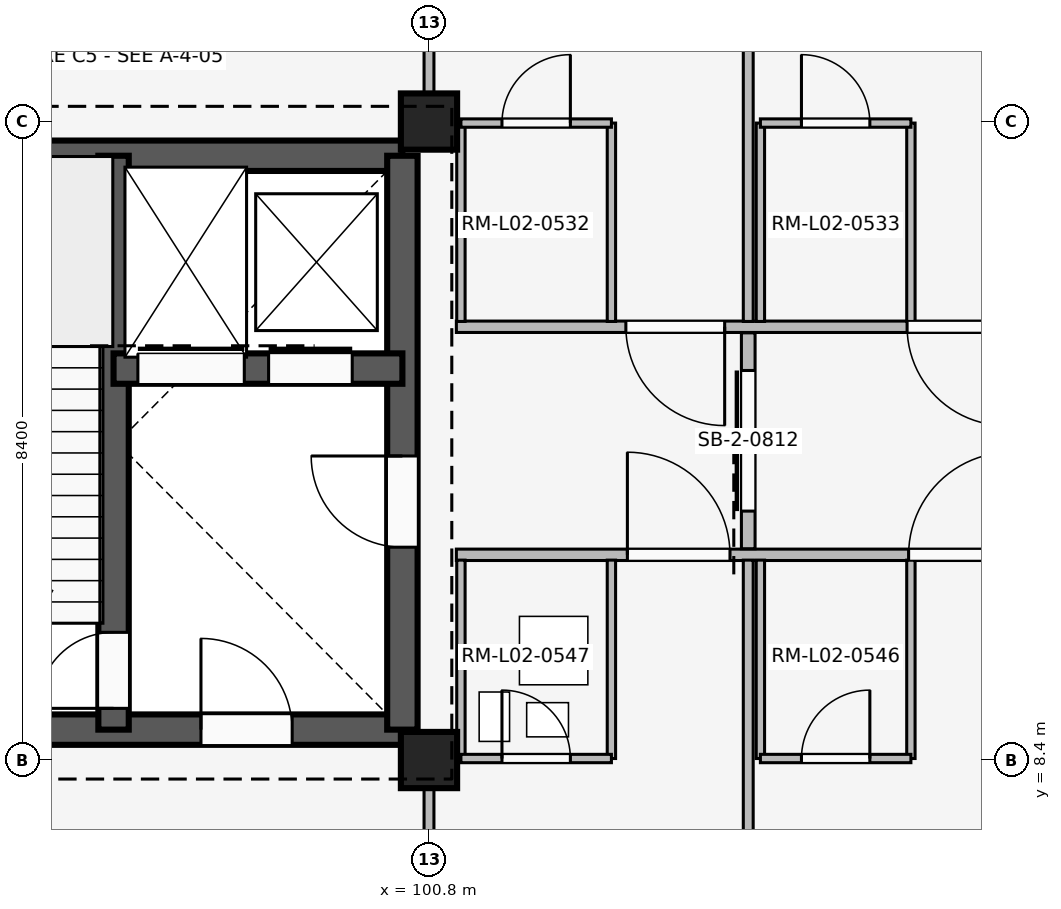
"""IFC4 building model, lengths in metres.
Left out: names, types, materials, properties, quantities, classifications, styles, units other than length and angle.
Written with IfcOpenShell. Run it as: python <this file> out.ifc"""

import sys

from ifc_helpers import new_model, si_unit, direction, frame, frame_2d, origin, origin_2d, place, context, subcontext, project, spatial, rectangle, extrude, element, fill, save


model = new_model("IFC4")
c1 = context("Model", 3, precision=1e-05, world=origin(), true_north=direction((0.0, 1.0)))
c2 = subcontext(c1, "Body", "Model", "MODEL_VIEW")
j1 = project(units=[si_unit("LENGTHUNIT", "METRE"), si_unit("PLANEANGLEUNIT", "RADIAN")], contexts=[c1])
p1 = place(None, origin())
s1 = spatial("IfcSite", under=j1, at=p1, CompositionType="ELEMENT")
p2 = place(p1, origin())
s2 = spatial("IfcBuilding", under=s1, at=p2, CompositionType="ELEMENT")
p3 = place(p2, frame((0.0, 0.0, 8.1)))
s3 = spatial("IfcBuildingStorey", under=s2, at=p3, CompositionType="ELEMENT", Elevation=8.1)
for number, where, z_axis, x_axis in (
    (1, (100.8, 8.4, 0.0), (0.0, 0.0, 1.0), (1.0, 0.0, 0.0)),
    (2, (100.8, 16.8, 0.0), (0.0, 0.0, 1.0), (1.0, 0.0, 0.0)),
):
    element("IfcColumn", number, at=place(p3, frame(where, z_axis=z_axis, x_axis=x_axis)), inside=s3, PredefinedType="COLUMN", context=c2, shape_type="SweptSolid", body=[
        extrude(rectangle(XDim=0.74, YDim=0.74, at=origin_2d()), origin(), (0.0, 0.0, 1.0), 4.8),
    ])
p4 = place(p3, frame((92.95, 8.8, 0.0), z_axis=(0.0, 0.0, 1.0), x_axis=(1.0, 0.0, 0.0)))
e3 = element("IfcWall", 3, at=p4, inside=s3, PredefinedType="SHEAR", context=c2, shape_type="SweptSolid", body=[
    extrude(rectangle(XDim=7.5, YDim=0.4, at=frame_2d((3.75, 0.0))), origin(), (0.0, 0.0, 1.0), 4.52),
])
p5 = place(p4, frame((4.85, 0.0, 0.0)))
e4 = element("IfcOpeningElement", 4, at=p5, cuts=e3, PredefinedType="OPENING", context=c2, shape_type="SweptSolid", body=[
    extrude(rectangle(XDim=1.2, YDim=2.2, at=frame_2d((0.6, 1.1))), frame((0.0, 0.21, 0.0), z_axis=(0.0, -1.0, 0.0), x_axis=(1.0, 0.0, 0.0)), (0.0, 0.0, 1.0), 0.42),
])
p6 = place(p3, frame((92.95, 16.35, 0.0), z_axis=(0.0, 0.0, 1.0), x_axis=(1.0, 0.0, 0.0)))
e5 = element("IfcWall", 5, at=p6, inside=s3, PredefinedType="SHEAR", context=c2, shape_type="SweptSolid", body=[
    extrude(rectangle(XDim=7.5, YDim=0.4, at=frame_2d((3.75, 0.0))), origin(), (0.0, 0.0, 1.0), 4.52),
])
p7 = place(p3, frame((100.45, 8.8, 0.0), z_axis=(0.0, 0.0, 1.0), x_axis=(0.0, 1.0, 0.0)))
e6 = element("IfcWall", 6, at=p7, inside=s3, PredefinedType="SHEAR", context=c2, shape_type="SweptSolid", body=[
    extrude(rectangle(XDim=7.55, YDim=0.4, at=frame_2d((3.775, 0.0))), origin(), (0.0, 0.0, 1.0), 4.52),
])
p8 = place(p7, frame((2.4, 0.0, 0.0)))
e7 = element("IfcOpeningElement", 7, at=p8, cuts=e6, PredefinedType="OPENING", context=c2, shape_type="SweptSolid", body=[
    extrude(rectangle(XDim=1.2, YDim=2.2, at=frame_2d((0.6, 1.1))), frame((0.0, 0.21, 0.0), z_axis=(0.0, -1.0, 0.0), x_axis=(1.0, 0.0, 0.0)), (0.0, 0.0, 1.0), 0.42),
])
p9 = place(p3, frame((96.65, 8.8, 0.0), z_axis=(0.0, 0.0, 1.0), x_axis=(0.0, 1.0, 0.0)))
e8 = element("IfcWall", 8, at=p9, inside=s3, PredefinedType="SHEAR", context=c2, shape_type="SweptSolid", body=[
    extrude(rectangle(XDim=7.55, YDim=0.4, at=frame_2d((3.775, 0.0))), origin(), (0.0, 0.0, 1.0), 4.52),
])
p10 = place(p9, frame((0.28, 0.0, 0.0)))
e9 = element("IfcOpeningElement", 9, at=p10, cuts=e8, PredefinedType="OPENING", context=c2, shape_type="SweptSolid", body=[
    extrude(rectangle(XDim=1.0, YDim=2.15, at=frame_2d((0.5, 1.075))), frame((0.0, 0.21, 0.0), z_axis=(0.0, -1.0, 0.0), x_axis=(1.0, 0.0, 0.0)), (0.0, 0.0, 1.0), 0.42),
])
p11 = place(p3, frame((96.65, 13.55, 0.0), z_axis=(0.0, 0.0, 1.0), x_axis=(1.0, 0.0, 0.0)))
e10 = element("IfcWall", 10, at=p11, inside=s3, PredefinedType="SHEAR", context=c2, shape_type="SweptSolid", body=[
    extrude(rectangle(XDim=3.8, YDim=0.4, at=frame_2d((1.9, 0.0))), origin(), (0.0, 0.0, 1.0), 4.52),
])
p12 = place(p11, frame((0.32, 0.0, 0.0)))
e11 = element("IfcOpeningElement", 11, at=p12, cuts=e10, PredefinedType="OPENING", context=c2, shape_type="SweptSolid", body=[
    extrude(rectangle(XDim=1.4, YDim=2.25, at=frame_2d((0.7, 1.125))), frame((0.0, 0.21, 0.0), z_axis=(0.0, -1.0, 0.0), x_axis=(1.0, 0.0, 0.0)), (0.0, 0.0, 1.0), 0.42),
])
p13 = place(p11, frame((2.04, 0.0, 0.0)))
e12 = element("IfcOpeningElement", 12, at=p13, cuts=e10, PredefinedType="OPENING", context=c2, shape_type="SweptSolid", body=[
    extrude(rectangle(XDim=1.1, YDim=2.15, at=frame_2d((0.55, 1.075))), frame((0.0, 0.21, 0.0), z_axis=(0.0, -1.0, 0.0), x_axis=(1.0, 0.0, 0.0)), (0.0, 0.0, 1.0), 0.42),
])
p14 = place(p3, frame((100.8, 0.14, 0.0), z_axis=(0.0, 0.0, 1.0), x_axis=(0.0, 1.0, 0.0)))
e13 = element("IfcWall", 13, at=p14, inside=s3, PredefinedType="PARTITIONING", context=c2, shape_type="SweptSolid", body=[
    extrude(rectangle(XDim=8.21, YDim=0.13, at=frame_2d((4.105, 0.0))), origin(), (0.0, 0.0, 1.0), 3.84),
])
p15 = place(p14, frame((3.64, 0.0, 0.0)))
e14 = element("IfcOpeningElement", 14, at=p15, cuts=e13, PredefinedType="OPENING", context=c2, shape_type="SweptSolid", body=[
    extrude(rectangle(XDim=1.08, YDim=2.15, at=frame_2d((0.54, 1.075))), frame((0.0, 0.075, 0.0), z_axis=(0.0, -1.0, 0.0), x_axis=(1.0, 0.0, 0.0)), (0.0, 0.0, 1.0), 0.15),
])
p16 = place(p3, frame((100.8, 17.15, 0.0), z_axis=(0.0, 0.0, 1.0), x_axis=(0.0, 1.0, 0.0)))
e15 = element("IfcWall", 15, at=p16, inside=s3, PredefinedType="PARTITIONING", context=c2, shape_type="SweptSolid", body=[
    extrude(rectangle(XDim=7.91, YDim=0.13, at=frame_2d((3.955, 0.0))), origin(), (0.0, 0.0, 1.0), 3.84),
])
p17 = place(p16, frame((3.4, 0.0, 0.0)))
e16 = element("IfcOpeningElement", 16, at=p17, cuts=e15, PredefinedType="OPENING", context=c2, shape_type="SweptSolid", body=[
    extrude(rectangle(XDim=1.05, YDim=2.2, at=frame_2d((0.525, 1.1))), frame((0.0, 0.075, 0.0), z_axis=(0.0, -1.0, 0.0), x_axis=(1.0, 0.0, 0.0)), (0.0, 0.0, 1.0), 0.15),
])
p18 = place(p3, frame((101.16, 11.1, 0.0), z_axis=(0.0, 0.0, 1.0), x_axis=(1.0, 0.0, 0.0)))
e17 = element("IfcWall", 17, at=p18, inside=s3, PredefinedType="PARTITIONING", context=c2, shape_type="SweptSolid", body=[
    extrude(rectangle(XDim=7.96, YDim=0.15, at=frame_2d((3.98, 0.0))), origin(), (0.0, 0.0, 1.0), 3.84),
])
p19 = place(p18, frame((2.25, 0.0, 0.0)))
e18 = element("IfcOpeningElement", 18, at=p19, cuts=e17, PredefinedType="OPENING", context=c2, shape_type="SweptSolid", body=[
    extrude(rectangle(XDim=1.35, YDim=2.25, at=frame_2d((0.675, 1.125))), frame((0.0, 0.085, 0.0), z_axis=(0.0, -1.0, 0.0), x_axis=(1.0, 0.0, 0.0)), (0.0, 0.0, 1.0), 0.17),
])
p20 = place(p18, frame((5.95, 0.0, 0.0)))
e19 = element("IfcOpeningElement", 19, at=p20, cuts=e17, PredefinedType="OPENING", context=c2, shape_type="SweptSolid", body=[
    extrude(rectangle(XDim=1.35, YDim=2.25, at=frame_2d((0.675, 1.125))), frame((0.0, 0.085, 0.0), z_axis=(0.0, -1.0, 0.0), x_axis=(1.0, 0.0, 0.0)), (0.0, 0.0, 1.0), 0.17),
])
p21 = place(p3, frame((105.0, 0.1, 0.0), z_axis=(0.0, 0.0, 1.0), x_axis=(0.0, 1.0, 0.0)))
e20 = element("IfcWall", 20, at=p21, inside=s3, PredefinedType="PARTITIONING", context=c2, shape_type="SweptSolid", body=[
    extrude(rectangle(XDim=10.93, YDim=0.13, at=frame_2d((5.465, 0.0))), origin(), (0.0, 0.0, 1.0), 3.84),
])
for number, where, z_axis, x_axis in (
    (21, (101.22, 8.42, 0.0), (0.0, 0.0, 1.0), (0.0, 1.0, 0.0)),
    (22, (103.2, 8.42, 0.0), (0.0, 0.0, 1.0), (0.0, 1.0, 0.0)),
):
    element("IfcWall", number, at=place(p3, frame(where, z_axis=z_axis, x_axis=x_axis)), inside=s3, PredefinedType="PARTITIONING", context=c2, shape_type="SweptSolid", body=[
        extrude(rectangle(XDim=2.61, YDim=0.11, at=frame_2d((1.305, 0.0))), origin(), (0.0, 0.0, 1.0), 3.84),
    ])
p22 = place(p3, frame((101.22, 8.42, 0.0), z_axis=(0.0, 0.0, 1.0), x_axis=(1.0, 0.0, 0.0)))
e23 = element("IfcWall", 23, at=p22, inside=s3, PredefinedType="PARTITIONING", context=c2, shape_type="SweptSolid", body=[
    extrude(rectangle(XDim=1.98, YDim=0.11, at=frame_2d((0.99, 0.0))), origin(), (0.0, 0.0, 1.0), 3.84),
])
p23 = place(p22, frame((0.54, 0.0, 0.0)))
e24 = element("IfcOpeningElement", 24, at=p23, cuts=e23, PredefinedType="OPENING", context=c2, shape_type="SweptSolid", body=[
    extrude(rectangle(XDim=0.9, YDim=2.1, at=frame_2d((0.45, 1.05))), frame((0.0, 0.065, 0.0), z_axis=(0.0, -1.0, 0.0), x_axis=(1.0, 0.0, 0.0)), (0.0, 0.0, 1.0), 0.13),
])
for number, where, z_axis, x_axis in (
    (25, (105.16, 8.42, 0.0), (0.0, 0.0, 1.0), (0.0, 1.0, 0.0)),
    (26, (107.14, 8.42, 0.0), (0.0, 0.0, 1.0), (0.0, 1.0, 0.0)),
):
    element("IfcWall", number, at=place(p3, frame(where, z_axis=z_axis, x_axis=x_axis)), inside=s3, PredefinedType="PARTITIONING", context=c2, shape_type="SweptSolid", body=[
        extrude(rectangle(XDim=2.61, YDim=0.11, at=frame_2d((1.305, 0.0))), origin(), (0.0, 0.0, 1.0), 3.84),
    ])
p24 = place(p3, frame((105.16, 8.42, 0.0), z_axis=(0.0, 0.0, 1.0), x_axis=(1.0, 0.0, 0.0)))
e27 = element("IfcWall", 27, at=p24, inside=s3, PredefinedType="PARTITIONING", context=c2, shape_type="SweptSolid", body=[
    extrude(rectangle(XDim=1.98, YDim=0.11, at=frame_2d((0.99, 0.0))), origin(), (0.0, 0.0, 1.0), 3.84),
])
p25 = place(p24, frame((0.54, 0.0, 0.0)))
e28 = element("IfcOpeningElement", 28, at=p25, cuts=e27, PredefinedType="OPENING", context=c2, shape_type="SweptSolid", body=[
    extrude(rectangle(XDim=0.9, YDim=2.1, at=frame_2d((0.45, 1.05))), frame((0.0, 0.065, 0.0), z_axis=(0.0, -1.0, 0.0), x_axis=(1.0, 0.0, 0.0)), (0.0, 0.0, 1.0), 0.13),
])
p26 = place(p3, frame((109.12, 14.1, 0.0), z_axis=(0.0, 0.0, 1.0), x_axis=(-1.0, 0.0, 0.0)))
e29 = element("IfcWall", 29, at=p26, inside=s3, PredefinedType="PARTITIONING", context=c2, shape_type="SweptSolid", body=[
    extrude(rectangle(XDim=7.96, YDim=0.15, at=frame_2d((3.98, 0.0))), origin(), (0.0, 0.0, 1.0), 3.84),
])
p27 = place(p26, frame((0.73, 0.0, 0.0)))
e30 = element("IfcOpeningElement", 30, at=p27, cuts=e29, PredefinedType="OPENING", context=c2, shape_type="SweptSolid", body=[
    extrude(rectangle(XDim=1.3, YDim=2.25, at=frame_2d((0.65, 1.125))), frame((0.0, 0.085, 0.0), z_axis=(0.0, -1.0, 0.0), x_axis=(1.0, 0.0, 0.0)), (0.0, 0.0, 1.0), 0.17),
])
p28 = place(p26, frame((4.43, 0.0, 0.0)))
e31 = element("IfcOpeningElement", 31, at=p28, cuts=e29, PredefinedType="OPENING", context=c2, shape_type="SweptSolid", body=[
    extrude(rectangle(XDim=1.3, YDim=2.25, at=frame_2d((0.65, 1.125))), frame((0.0, 0.085, 0.0), z_axis=(0.0, -1.0, 0.0), x_axis=(1.0, 0.0, 0.0)), (0.0, 0.0, 1.0), 0.17),
])
p29 = place(p3, frame((105.0, 14.17, 0.0), z_axis=(0.0, 0.0, 1.0), x_axis=(0.0, 1.0, 0.0)))
e32 = element("IfcWall", 32, at=p29, inside=s3, PredefinedType="PARTITIONING", context=c2, shape_type="SweptSolid", body=[
    extrude(rectangle(XDim=10.93, YDim=0.13, at=frame_2d((5.465, 0.0))), origin(), (0.0, 0.0, 1.0), 3.84),
])
for number, where, z_axis, x_axis in (
    (33, (101.22, 14.17, 0.0), (0.0, 0.0, 1.0), (0.0, 1.0, 0.0)),
    (34, (103.2, 14.17, 0.0), (0.0, 0.0, 1.0), (0.0, 1.0, 0.0)),
):
    element("IfcWall", number, at=place(p3, frame(where, z_axis=z_axis, x_axis=x_axis)), inside=s3, PredefinedType="PARTITIONING", context=c2, shape_type="SweptSolid", body=[
        extrude(rectangle(XDim=2.61, YDim=0.11, at=frame_2d((1.305, 0.0))), origin(), (0.0, 0.0, 1.0), 3.84),
    ])
p30 = place(p3, frame((101.22, 16.78, 0.0), z_axis=(0.0, 0.0, 1.0), x_axis=(1.0, 0.0, 0.0)))
e35 = element("IfcWall", 35, at=p30, inside=s3, PredefinedType="PARTITIONING", context=c2, shape_type="SweptSolid", body=[
    extrude(rectangle(XDim=1.98, YDim=0.11, at=frame_2d((0.99, 0.0))), origin(), (0.0, 0.0, 1.0), 3.84),
])
p31 = place(p30, frame((0.54, 0.0, 0.0)))
e36 = element("IfcOpeningElement", 36, at=p31, cuts=e35, PredefinedType="OPENING", context=c2, shape_type="SweptSolid", body=[
    extrude(rectangle(XDim=0.9, YDim=2.1, at=frame_2d((0.45, 1.05))), frame((0.0, 0.065, 0.0), z_axis=(0.0, -1.0, 0.0), x_axis=(1.0, 0.0, 0.0)), (0.0, 0.0, 1.0), 0.13),
])
for number, where, z_axis, x_axis in (
    (37, (105.16, 14.17, 0.0), (0.0, 0.0, 1.0), (0.0, 1.0, 0.0)),
    (38, (107.14, 14.17, 0.0), (0.0, 0.0, 1.0), (0.0, 1.0, 0.0)),
):
    element("IfcWall", number, at=place(p3, frame(where, z_axis=z_axis, x_axis=x_axis)), inside=s3, PredefinedType="PARTITIONING", context=c2, shape_type="SweptSolid", body=[
        extrude(rectangle(XDim=2.61, YDim=0.11, at=frame_2d((1.305, 0.0))), origin(), (0.0, 0.0, 1.0), 3.84),
    ])
p32 = place(p3, frame((105.16, 16.78, 0.0), z_axis=(0.0, 0.0, 1.0), x_axis=(1.0, 0.0, 0.0)))
e39 = element("IfcWall", 39, at=p32, inside=s3, PredefinedType="PARTITIONING", context=c2, shape_type="SweptSolid", body=[
    extrude(rectangle(XDim=1.98, YDim=0.11, at=frame_2d((0.99, 0.0))), origin(), (0.0, 0.0, 1.0), 3.84),
])
p33 = place(p32, frame((0.54, 0.0, 0.0)))
e40 = element("IfcOpeningElement", 40, at=p33, cuts=e39, PredefinedType="OPENING", context=c2, shape_type="SweptSolid", body=[
    extrude(rectangle(XDim=0.9, YDim=2.1, at=frame_2d((0.45, 1.05))), frame((0.0, 0.065, 0.0), z_axis=(0.0, -1.0, 0.0), x_axis=(1.0, 0.0, 0.0)), (0.0, 0.0, 1.0), 0.13),
])
p34 = place(p3, frame((105.0, 11.18, 0.0), z_axis=(0.0, 0.0, 1.0), x_axis=(0.0, 1.0, 0.0)))
e41 = element("IfcWall", 41, at=p34, inside=s3, PredefinedType="PARTITIONING", context=c2, shape_type="SweptSolid", body=[
    extrude(rectangle(XDim=2.84, YDim=0.18, at=frame_2d((1.42, 0.0))), origin(), (0.0, 0.0, 1.0), 3.84),
])
p35 = place(p34, frame((0.495, 0.0, 0.0)))
e42 = element("IfcOpeningElement", 42, at=p35, cuts=e41, PredefinedType="OPENING", context=c2, shape_type="SweptSolid", body=[
    extrude(rectangle(XDim=1.85, YDim=2.3, at=frame_2d((0.925, 1.15))), frame((0.0, 0.1, 0.0), z_axis=(0.0, -1.0, 0.0), x_axis=(1.0, 0.0, 0.0)), (0.0, 0.0, 1.0), 0.2),
])
p36 = place(p8, origin())
e43 = element("IfcDoor", 43, at=p36, inside=s3, OperationType="SINGLE_SWING_RIGHT", PredefinedType="DOOR", context=c2, shape_type="SweptSolid", body=[
    extrude(rectangle(XDim=1.2, YDim=2.2, at=frame_2d((0.6, 1.1))), frame((0.0, 0.025, 0.0), z_axis=(0.0, -1.0, 0.0), x_axis=(1.0, 0.0, 0.0)), (0.0, 0.0, 1.0), 0.05),
])
fill(e7, e43)
p37 = place(p5, origin())
e44 = element("IfcDoor", 44, at=p37, inside=s3, OperationType="SINGLE_SWING_LEFT", PredefinedType="DOOR", context=c2, shape_type="SweptSolid", body=[
    extrude(rectangle(XDim=1.2, YDim=2.2, at=frame_2d((0.6, 1.1))), frame((0.0, 0.025, 0.0), z_axis=(0.0, -1.0, 0.0), x_axis=(1.0, 0.0, 0.0)), (0.0, 0.0, 1.0), 0.05),
])
fill(e4, e44)
p38 = place(p10, origin())
e45 = element("IfcDoor", 45, at=p38, inside=s3, OperationType="SINGLE_SWING_LEFT", PredefinedType="DOOR", context=c2, shape_type="SweptSolid", body=[
    extrude(rectangle(XDim=1.0, YDim=2.15, at=frame_2d((0.5, 1.075))), frame((0.0, 0.025, 0.0), z_axis=(0.0, -1.0, 0.0), x_axis=(1.0, 0.0, 0.0)), (0.0, 0.0, 1.0), 0.05),
])
fill(e9, e45)
p39 = place(p12, origin())
e46 = element("IfcDoor", 46, at=p39, inside=s3, OperationType="SLIDING_TO_LEFT", PredefinedType="DOOR", context=c2, shape_type="SweptSolid", body=[
    extrude(rectangle(XDim=1.4, YDim=2.25, at=frame_2d((0.7, 1.125))), frame((0.0, 0.025, 0.0), z_axis=(0.0, -1.0, 0.0), x_axis=(1.0, 0.0, 0.0)), (0.0, 0.0, 1.0), 0.05),
])
fill(e11, e46)
p40 = place(p13, origin())
e47 = element("IfcDoor", 47, at=p40, inside=s3, OperationType="SLIDING_TO_LEFT", PredefinedType="DOOR", context=c2, shape_type="SweptSolid", body=[
    extrude(rectangle(XDim=1.1, YDim=2.15, at=frame_2d((0.55, 1.075))), frame((0.0, 0.025, 0.0), z_axis=(0.0, -1.0, 0.0), x_axis=(1.0, 0.0, 0.0)), (0.0, 0.0, 1.0), 0.05),
])
fill(e12, e47)
p41 = place(p19, origin())
e48 = element("IfcDoor", 48, at=p41, inside=s3, OperationType="SINGLE_SWING_LEFT", PredefinedType="DOOR", context=c2, shape_type="SweptSolid", body=[
    extrude(rectangle(XDim=1.35, YDim=2.25, at=frame_2d((0.675, 1.125))), frame((0.0, 0.025, 0.0), z_axis=(0.0, -1.0, 0.0), x_axis=(1.0, 0.0, 0.0)), (0.0, 0.0, 1.0), 0.05),
])
fill(e18, e48)
p42 = place(p20, origin())
e49 = element("IfcDoor", 49, at=p42, inside=s3, OperationType="SINGLE_SWING_RIGHT", PredefinedType="DOOR", context=c2, shape_type="SweptSolid", body=[
    extrude(rectangle(XDim=1.35, YDim=2.25, at=frame_2d((0.675, 1.125))), frame((0.0, 0.025, 0.0), z_axis=(0.0, -1.0, 0.0), x_axis=(1.0, 0.0, 0.0)), (0.0, 0.0, 1.0), 0.05),
])
fill(e19, e49)
p43 = place(p23, origin())
e50 = element("IfcDoor", 50, at=p43, inside=s3, OperationType="SINGLE_SWING_LEFT", PredefinedType="DOOR", context=c2, shape_type="SweptSolid", body=[
    extrude(rectangle(XDim=0.9, YDim=2.1, at=frame_2d((0.45, 1.05))), frame((0.0, 0.025, 0.0), z_axis=(0.0, -1.0, 0.0), x_axis=(1.0, 0.0, 0.0)), (0.0, 0.0, 1.0), 0.05),
])
fill(e24, e50)
p44 = place(p25, origin())
e51 = element("IfcDoor", 51, at=p44, inside=s3, OperationType="SINGLE_SWING_RIGHT", PredefinedType="DOOR", context=c2, shape_type="SweptSolid", body=[
    extrude(rectangle(XDim=0.9, YDim=2.1, at=frame_2d((0.45, 1.05))), frame((0.0, 0.025, 0.0), z_axis=(0.0, -1.0, 0.0), x_axis=(1.0, 0.0, 0.0)), (0.0, 0.0, 1.0), 0.05),
])
fill(e28, e51)
p45 = place(p27, origin())
e52 = element("IfcDoor", 52, at=p45, inside=s3, OperationType="SINGLE_SWING_LEFT", PredefinedType="DOOR", context=c2, shape_type="SweptSolid", body=[
    extrude(rectangle(XDim=1.3, YDim=2.25, at=frame_2d((0.65, 1.125))), frame((0.0, 0.025, 0.0), z_axis=(0.0, -1.0, 0.0), x_axis=(1.0, 0.0, 0.0)), (0.0, 0.0, 1.0), 0.05),
])
fill(e30, e52)
p46 = place(p28, origin())
e53 = element("IfcDoor", 53, at=p46, inside=s3, OperationType="SINGLE_SWING_LEFT", PredefinedType="DOOR", context=c2, shape_type="SweptSolid", body=[
    extrude(rectangle(XDim=1.3, YDim=2.25, at=frame_2d((0.65, 1.125))), frame((0.0, 0.025, 0.0), z_axis=(0.0, -1.0, 0.0), x_axis=(1.0, 0.0, 0.0)), (0.0, 0.0, 1.0), 0.05),
])
fill(e31, e53)
p47 = place(p31, origin())
e54 = element("IfcDoor", 54, at=p47, inside=s3, OperationType="SINGLE_SWING_RIGHT", PredefinedType="DOOR", context=c2, shape_type="SweptSolid", body=[
    extrude(rectangle(XDim=0.9, YDim=2.1, at=frame_2d((0.45, 1.05))), frame((0.0, 0.025, 0.0), z_axis=(0.0, -1.0, 0.0), x_axis=(1.0, 0.0, 0.0)), (0.0, 0.0, 1.0), 0.05),
])
fill(e36, e54)
p48 = place(p33, origin())
e55 = element("IfcDoor", 55, at=p48, inside=s3, OperationType="SINGLE_SWING_LEFT", PredefinedType="DOOR", context=c2, shape_type="SweptSolid", body=[
    extrude(rectangle(XDim=0.9, YDim=2.1, at=frame_2d((0.45, 1.05))), frame((0.0, 0.025, 0.0), z_axis=(0.0, -1.0, 0.0), x_axis=(1.0, 0.0, 0.0)), (0.0, 0.0, 1.0), 0.05),
])
fill(e40, e55)
p49 = place(p35, origin())
e56 = element("IfcDoor", 56, at=p49, inside=s3, OperationType="SLIDING_TO_LEFT", PredefinedType="DOOR", context=c2, shape_type="SweptSolid", body=[
    extrude(rectangle(XDim=1.85, YDim=2.3, at=frame_2d((0.925, 1.15))), frame((0.0, 0.025, 0.0), z_axis=(0.0, -1.0, 0.0), x_axis=(1.0, 0.0, 0.0)), (0.0, 0.0, 1.0), 0.05),
])
fill(e42, e56)
save(model, sys.argv[1])
